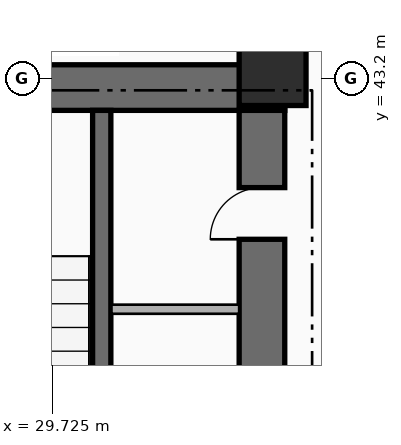
"""IFC4 building model, lengths in metres.
Left out: names, types, materials, properties, quantities, classifications, styles, units other than length and angle.
Written with IfcOpenShell. Run it as: python <this file> out.ifc"""

import sys

from ifc_helpers import new_model, si_unit, direction, frame, frame_2d, origin, origin_2d, place, context, subcontext, project, spatial, rectangle, extrude, element, fill, save


model = new_model("IFC4")
c1 = context("Model", 3, precision=1e-05, world=origin(), true_north=direction((0.0, 1.0)))
c2 = subcontext(c1, "Body", "Model", "MODEL_VIEW")
j1 = project(units=[si_unit("LENGTHUNIT", "METRE"), si_unit("PLANEANGLEUNIT", "RADIAN")], contexts=[c1])
p1 = place(None, origin())
s1 = spatial("IfcSite", under=j1, at=p1, CompositionType="ELEMENT")
p2 = place(p1, origin())
s2 = spatial("IfcBuilding", under=s1, at=p2, CompositionType="ELEMENT")
p3 = place(p2, frame((0.0, 0.0, -9.6)))
s3 = spatial("IfcBuildingStorey", under=s2, at=p3, CompositionType="ELEMENT", Elevation=-9.6)
p4 = place(p3, frame((25.47, 43.045, 0.0), z_axis=(0.0, 0.0, 1.0), x_axis=(1.0, 0.0, 0.0)))
e1 = element("IfcWall", 1, at=p4, inside=s3, PredefinedType="SHEAR", context=c2, shape_type="SweptSolid", body=[
    extrude(rectangle(XDim=8.08, YDim=0.75, at=frame_2d((4.04, 0.0))), origin(), (0.0, 0.0, 1.0), 4.8),
])
p5 = place(p3, frame((33.175, 33.19, 0.0), z_axis=(0.0, 0.0, 1.0), x_axis=(0.0, 1.0, 0.0)))
e2 = element("IfcWall", 2, at=p5, inside=s3, PredefinedType="SHEAR", context=c2, shape_type="SweptSolid", body=[
    extrude(rectangle(XDim=9.48, YDim=0.75, at=frame_2d((4.74, 0.0))), origin(), (0.0, 0.0, 1.0), 4.8),
])
p6 = place(p5, frame((4.16, 0.0, 0.0)))
e3 = element("IfcOpeningElement", 3, at=p6, cuts=e2, PredefinedType="OPENING", context=c2, shape_type="SweptSolid", body=[
    extrude(rectangle(XDim=0.85, YDim=2.08, at=frame_2d((0.425, 1.04))), frame((0.0, 0.385, 0.0), z_axis=(0.0, -1.0, 0.0), x_axis=(1.0, 0.0, 0.0)), (0.0, 0.0, 1.0), 0.77),
])
p7 = place(p5, frame((7.36, 0.0, 0.0)))
e4 = element("IfcOpeningElement", 4, at=p7, cuts=e2, PredefinedType="OPENING", context=c2, shape_type="SweptSolid", body=[
    extrude(rectangle(XDim=0.85, YDim=2.08, at=frame_2d((0.425, 1.04))), frame((0.0, 0.385, 0.0), z_axis=(0.0, -1.0, 0.0), x_axis=(1.0, 0.0, 0.0)), (0.0, 0.0, 1.0), 0.77),
])
p8 = place(p3, frame((30.54, 33.19, 0.0), z_axis=(0.0, 0.0, 1.0), x_axis=(0.0, 1.0, 0.0)))
e5 = element("IfcWall", 5, at=p8, inside=s3, PredefinedType="SHEAR", context=c2, shape_type="SweptSolid", body=[
    extrude(rectangle(XDim=9.48, YDim=0.3, at=frame_2d((4.74, 0.0))), origin(), (0.0, 0.0, 1.0), 4.8),
])
p9 = place(p3, frame((33.35, 43.3, 0.0), z_axis=(0.0, 0.0, 1.0), x_axis=(1.0, 0.0, 0.0)))
e6 = element("IfcColumn", 6, at=p9, inside=s3, PredefinedType="COLUMN", context=c2, shape_type="SweptSolid", body=[
    extrude(rectangle(XDim=1.1, YDim=1.1, at=origin_2d()), origin(), (0.0, 0.0, 1.0), 4.8),
])
p10 = place(p3, frame((30.7, 39.4, 0.0), z_axis=(0.0, 0.0, 1.0), x_axis=(1.0, 0.0, 0.0)))
e7 = element("IfcWall", 7, at=p10, inside=s3, PredefinedType="PARTITIONING", context=c2, shape_type="SweptSolid", body=[
    extrude(rectangle(XDim=2.1, YDim=0.15, at=frame_2d((1.05, 0.0))), origin(), (0.0, 0.0, 1.0), 4.5),
])
p11 = place(p7, origin())
e8 = element("IfcDoor", 8, at=p11, inside=s3, OperationType="SINGLE_SWING_LEFT", PredefinedType="DOOR", context=c2, shape_type="SweptSolid", body=[
    extrude(rectangle(XDim=0.85, YDim=2.08, at=frame_2d((0.425, 1.04))), frame((0.0, 0.025, 0.0), z_axis=(0.0, -1.0, 0.0), x_axis=(1.0, 0.0, 0.0)), (0.0, 0.0, 1.0), 0.05),
])
fill(e4, e8)
save(model, sys.argv[1])
